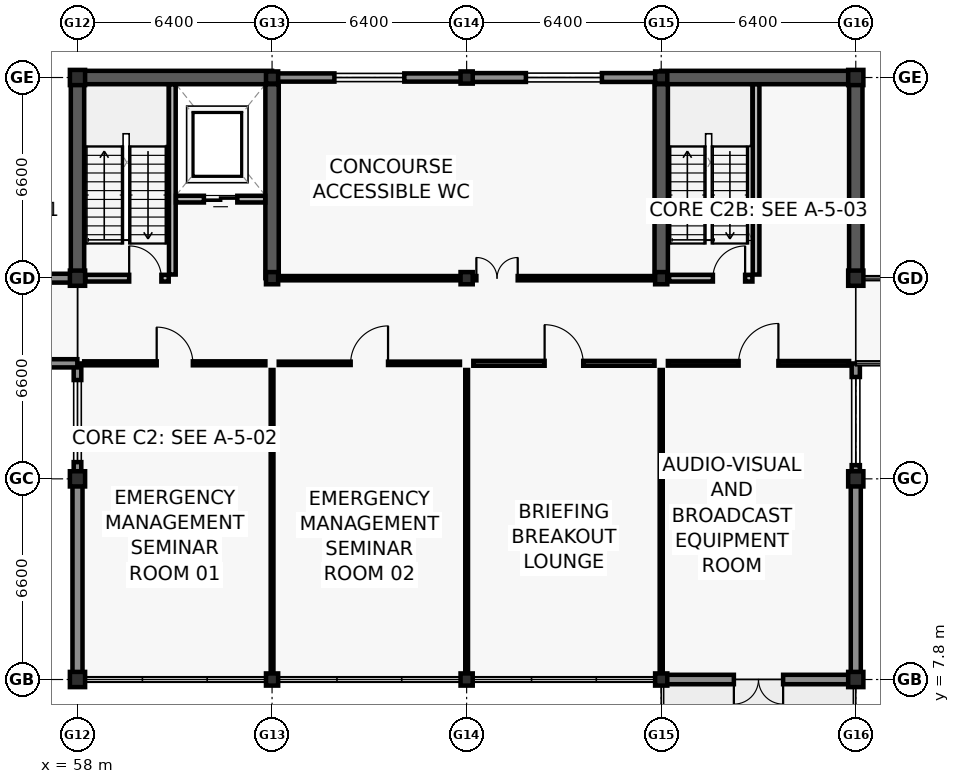
"""IFC4 building model, lengths in metres.
Left out: names, types, materials, properties, quantities, classifications, styles, units other than length and angle.
Written with IfcOpenShell. Run it as: python <this file> out.ifc"""

import sys

from ifc_helpers import new_model, si_unit, direction, frame, frame_2d, origin, origin_2d, place, context, subcontext, project, spatial, rectangle, i_section, extrude, element, fill, save


model = new_model("IFC4")
c1 = context("Model", 3, precision=1e-05, world=origin(), true_north=direction((0.0, 1.0)))
c2 = subcontext(c1, "Body", "Model", "MODEL_VIEW")
j1 = project(units=[si_unit("LENGTHUNIT", "METRE"), si_unit("PLANEANGLEUNIT", "RADIAN")], contexts=[c1])
p1 = place(None, origin())
s1 = spatial("IfcSite", under=j1, at=p1, CompositionType="ELEMENT")
p2 = place(p1, origin())
s2 = spatial("IfcBuilding", under=s1, at=p2, CompositionType="ELEMENT")
p3 = place(p2, frame((0.0, 0.0, 5.4)))
s3 = spatial("IfcBuildingStorey", under=s2, at=p3, CompositionType="ELEMENT", Elevation=5.4)
for number, where, z_axis, x_axis in (
    (1, (58.0, 7.8, 0.0), (0.0, 0.0, 1.0), (1.0, 0.0, 0.0)),
    (2, (58.0, 14.4, 0.0), (0.0, 0.0, 1.0), (1.0, 0.0, 0.0)),
    (3, (58.0, 21.0, 0.0), (0.0, 0.0, 1.0), (1.0, 0.0, 0.0)),
    (4, (58.0, 27.6, 0.0), (0.0, 0.0, 1.0), (1.0, 0.0, 0.0)),
):
    element("IfcColumn", number, at=place(p3, frame(where, z_axis=z_axis, x_axis=x_axis)), inside=s3, PredefinedType="COLUMN", context=c2, shape_type="SweptSolid", body=[
        extrude(i_section(OverallWidth=0.5, OverallDepth=0.5, WebThickness=0.02, FlangeThickness=0.036, at=origin_2d()), origin(), (0.0, 0.0, 1.0), 4.2),
    ])
for number, where, z_axis, x_axis in (
    (5, (64.4, 7.8, 0.0), (0.0, 0.0, 1.0), (1.0, 0.0, 0.0)),
    (6, (64.4, 21.0, 0.0), (0.0, 0.0, 1.0), (1.0, 0.0, 0.0)),
    (7, (64.4, 27.6, 0.0), (0.0, 0.0, 1.0), (1.0, 0.0, 0.0)),
    (8, (70.8, 7.8, 0.0), (0.0, 0.0, 1.0), (1.0, 0.0, 0.0)),
    (9, (70.8, 21.0, 0.0), (0.0, 0.0, 1.0), (1.0, 0.0, 0.0)),
    (10, (70.8, 27.6, 0.0), (0.0, 0.0, 1.0), (1.0, 0.0, 0.0)),
    (11, (77.2, 7.8, 0.0), (0.0, 0.0, 1.0), (1.0, 0.0, 0.0)),
    (12, (77.2, 21.0, 0.0), (0.0, 0.0, 1.0), (1.0, 0.0, 0.0)),
    (13, (77.2, 27.6, 0.0), (0.0, 0.0, 1.0), (1.0, 0.0, 0.0)),
):
    element("IfcColumn", number, at=place(p3, frame(where, z_axis=z_axis, x_axis=x_axis)), inside=s3, PredefinedType="COLUMN", context=c2, shape_type="SweptSolid", body=[
        extrude(i_section(OverallWidth=0.4, OverallDepth=0.4, WebThickness=0.02, FlangeThickness=0.032, at=origin_2d()), origin(), (0.0, 0.0, 1.0), 4.2),
    ])
for number, where, z_axis, x_axis in (
    (14, (83.6, 7.8, 0.0), (0.0, 0.0, 1.0), (1.0, 0.0, 0.0)),
    (15, (83.6, 14.4, 0.0), (0.0, 0.0, 1.0), (1.0, 0.0, 0.0)),
    (16, (83.6, 21.0, 0.0), (0.0, 0.0, 1.0), (1.0, 0.0, 0.0)),
    (17, (83.6, 27.6, 0.0), (0.0, 0.0, 1.0), (1.0, 0.0, 0.0)),
):
    element("IfcColumn", number, at=place(p3, frame(where, z_axis=z_axis, x_axis=x_axis)), inside=s3, PredefinedType="COLUMN", context=c2, shape_type="SweptSolid", body=[
        extrude(i_section(OverallWidth=0.5, OverallDepth=0.5, WebThickness=0.02, FlangeThickness=0.036, at=origin_2d()), origin(), (0.0, 0.0, 1.0), 4.2),
    ])
p4 = place(p3, frame((58.0, 27.6, 0.0), z_axis=(0.0, 0.0, 1.0), x_axis=(1.0, 0.0, 0.0)))
e18 = element("IfcWall", 18, at=p4, inside=s3, PredefinedType="SHEAR", context=c2, shape_type="SweptSolid", body=[
    extrude(rectangle(XDim=6.4, YDim=0.44, at=frame_2d((3.2, 0.0))), origin(), (0.0, 0.0, 1.0), 3.96),
])
for number, where, z_axis, x_axis in (
    (19, (58.0, 21.0, 0.0), (0.0, 0.0, 1.0), (0.0, 1.0, 0.0)),
    (20, (64.4, 21.0, 0.0), (0.0, 0.0, 1.0), (0.0, 1.0, 0.0)),
):
    element("IfcWall", number, at=place(p3, frame(where, z_axis=z_axis, x_axis=x_axis)), inside=s3, PredefinedType="SHEAR", context=c2, shape_type="SweptSolid", body=[
        extrude(rectangle(XDim=6.38, YDim=0.44, at=frame_2d((3.19, 0.0))), origin(), (0.0, 0.0, 1.0), 3.96),
    ])
p5 = place(p3, frame((77.2, 27.6, 0.0), z_axis=(0.0, 0.0, 1.0), x_axis=(1.0, 0.0, 0.0)))
e21 = element("IfcWall", 21, at=p5, inside=s3, PredefinedType="SHEAR", context=c2, shape_type="SweptSolid", body=[
    extrude(rectangle(XDim=6.4, YDim=0.44, at=frame_2d((3.2, 0.0))), origin(), (0.0, 0.0, 1.0), 3.96),
])
for number, where, z_axis, x_axis in (
    (22, (77.2, 21.0, 0.0), (0.0, 0.0, 1.0), (0.0, 1.0, 0.0)),
    (23, (83.6, 21.0, 0.0), (0.0, 0.0, 1.0), (0.0, 1.0, 0.0)),
):
    element("IfcWall", number, at=place(p3, frame(where, z_axis=z_axis, x_axis=x_axis)), inside=s3, PredefinedType="SHEAR", context=c2, shape_type="SweptSolid", body=[
        extrude(rectangle(XDim=6.38, YDim=0.44, at=frame_2d((3.19, 0.0))), origin(), (0.0, 0.0, 1.0), 3.96),
    ])
p6 = place(p3, frame((64.405, 27.6, 0.0), z_axis=(0.0, 0.0, 1.0), x_axis=(1.0, 0.0, 0.0)))
e24 = element("IfcWall", 24, at=p6, inside=s3, PredefinedType="SOLIDWALL", context=c2, shape_type="SweptSolid", body=[
    extrude(rectangle(XDim=6.39, YDim=0.27, at=frame_2d((3.195, 0.0))), origin(), (0.0, 0.0, 1.0), 3.32),
])
p7 = place(p6, frame((2.045, 0.0, 0.72)))
e25 = element("IfcOpeningElement", 25, at=p7, cuts=e24, PredefinedType="OPENING", context=c2, shape_type="SweptSolid", body=[
    extrude(rectangle(XDim=2.3, YDim=1.15, at=frame_2d((1.15, 0.575))), frame((0.0, 0.145, 0.0), z_axis=(0.0, -1.0, 0.0), x_axis=(1.0, 0.0, 0.0)), (0.0, 0.0, 1.0), 0.29),
])
p8 = place(p3, frame((70.805, 27.6, 0.0), z_axis=(0.0, 0.0, 1.0), x_axis=(1.0, 0.0, 0.0)))
e26 = element("IfcWall", 26, at=p8, inside=s3, PredefinedType="SOLIDWALL", context=c2, shape_type="SweptSolid", body=[
    extrude(rectangle(XDim=6.39, YDim=0.29, at=frame_2d((3.195, 0.0))), origin(), (0.0, 0.0, 1.0), 3.32),
])
p9 = place(p8, frame((1.945, 0.0, 0.72)))
e27 = element("IfcOpeningElement", 27, at=p9, cuts=e26, PredefinedType="OPENING", context=c2, shape_type="SweptSolid", body=[
    extrude(rectangle(XDim=2.5, YDim=1.15, at=frame_2d((1.25, 0.575))), frame((0.0, 0.155, 0.0), z_axis=(0.0, -1.0, 0.0), x_axis=(1.0, 0.0, 0.0)), (0.0, 0.0, 1.0), 0.31),
])
p10 = place(p3, frame((83.595, 7.8, 0.0), z_axis=(0.0, 0.0, 1.0), x_axis=(-1.0, 0.0, 0.0)))
e28 = element("IfcWall", 28, at=p10, inside=s3, PredefinedType="SOLIDWALL", context=c2, shape_type="SweptSolid", body=[
    extrude(rectangle(XDim=6.39, YDim=0.31, at=frame_2d((3.195, 0.0))), origin(), (0.0, 0.0, 1.0), 3.32),
])
p11 = place(p10, frame((2.385, 0.0, 0.0)))
e29 = element("IfcOpeningElement", 29, at=p11, cuts=e28, PredefinedType="OPENING", context=c2, shape_type="SweptSolid", body=[
    extrude(rectangle(XDim=1.62, YDim=2.18, at=frame_2d((0.81, 1.09))), frame((0.0, 0.165, 0.0), z_axis=(0.0, -1.0, 0.0), x_axis=(1.0, 0.0, 0.0)), (0.0, 0.0, 1.0), 0.33),
])
for number, where, z_axis, x_axis in (
    (30, (58.0, 7.805, 0.0), (0.0, 0.0, 1.0), (0.0, 1.0, 0.0)),
    (31, (83.6, 14.395, 0.0), (0.0, 0.0, 1.0), (0.0, -1.0, 0.0)),
):
    element("IfcWall", number, at=place(p3, frame(where, z_axis=z_axis, x_axis=x_axis)), inside=s3, PredefinedType="SOLIDWALL", context=c2, shape_type="SweptSolid", body=[
        extrude(rectangle(XDim=6.59, YDim=0.33, at=frame_2d((3.295, 0.0))), origin(), (0.0, 0.0, 1.0), 3.32),
    ])
p12 = place(p3, frame((58.0, 14.405, 0.0), z_axis=(0.0, 0.0, 1.0), x_axis=(0.0, 1.0, 0.0)))
e32 = element("IfcWall", 32, at=p12, inside=s3, PredefinedType="SOLIDWALL", context=c2, shape_type="SweptSolid", body=[
    extrude(rectangle(XDim=3.79, YDim=0.25, at=frame_2d((1.895, 0.0))), origin(), (0.0, 0.0, 1.0), 3.32),
])
p13 = place(p12, frame((0.545, 0.0, 0.72)))
e33 = element("IfcOpeningElement", 33, at=p13, cuts=e32, PredefinedType="OPENING", context=c2, shape_type="SweptSolid", body=[
    extrude(rectangle(XDim=2.7, YDim=1.15, at=frame_2d((1.35, 0.575))), frame((0.0, 0.135, 0.0), z_axis=(0.0, -1.0, 0.0), x_axis=(1.0, 0.0, 0.0)), (0.0, 0.0, 1.0), 0.27),
])
p14 = place(p3, frame((83.6, 18.195, 0.0), z_axis=(0.0, 0.0, 1.0), x_axis=(0.0, -1.0, 0.0)))
e34 = element("IfcWall", 34, at=p14, inside=s3, PredefinedType="SOLIDWALL", context=c2, shape_type="SweptSolid", body=[
    extrude(rectangle(XDim=3.79, YDim=0.27, at=frame_2d((1.895, 0.0))), origin(), (0.0, 0.0, 1.0), 3.32),
])
p15 = place(p14, frame((0.445, 0.0, 0.72)))
e35 = element("IfcOpeningElement", 35, at=p15, cuts=e34, PredefinedType="OPENING", context=c2, shape_type="SweptSolid", body=[
    extrude(rectangle(XDim=2.9, YDim=1.15, at=frame_2d((1.45, 0.575))), frame((0.0, 0.145, 0.0), z_axis=(0.0, -1.0, 0.0), x_axis=(1.0, 0.0, 0.0)), (0.0, 0.0, 1.0), 0.29),
])
p16 = place(p3, frame((57.995, 18.2, 0.0), z_axis=(0.0, 0.0, 1.0), x_axis=(-1.0, 0.0, 0.0)))
e36 = element("IfcWall", 36, at=p16, inside=s3, PredefinedType="SOLIDWALL", context=c2, shape_type="SweptSolid", body=[
    extrude(rectangle(XDim=1.19, YDim=0.27, at=frame_2d((0.595, 0.0))), origin(), (0.0, 0.0, 1.0), 3.32),
])
p17 = place(p3, frame((56.805, 21.0, 0.0), z_axis=(0.0, 0.0, 1.0), x_axis=(1.0, 0.0, 0.0)))
e37 = element("IfcWall", 37, at=p17, inside=s3, PredefinedType="SOLIDWALL", context=c2, shape_type="SweptSolid", body=[
    extrude(rectangle(XDim=1.19, YDim=0.29, at=frame_2d((0.595, 0.0))), origin(), (0.0, 0.0, 1.0), 3.32),
])
p18 = place(p3, frame((61.12, 21.12, 0.0), z_axis=(0.0, 0.0, 1.0), x_axis=(0.0, 1.0, 0.0)))
e38 = element("IfcWall", 38, at=p18, inside=s3, PredefinedType="SOLIDWALL", context=c2, shape_type="SweptSolid", body=[
    extrude(rectangle(XDim=6.255, YDim=0.22, at=frame_2d((3.127, 0.0))), origin(), (0.0, 0.0, 1.0), 3.96),
])
p19 = place(p3, frame((58.26, 21.0, 0.0), z_axis=(0.0, 0.0, 1.0), x_axis=(1.0, 0.0, 0.0)))
e39 = element("IfcWall", 39, at=p19, inside=s3, PredefinedType="SOLIDWALL", context=c2, shape_type="SweptSolid", body=[
    extrude(rectangle(XDim=2.74, YDim=0.22, at=frame_2d((1.37, 0.0))), origin(), (0.0, 0.0, 1.0), 3.32),
])
p20 = place(p19, frame((1.44, 0.0, 0.0)))
e40 = element("IfcOpeningElement", 40, at=p20, cuts=e39, PredefinedType="OPENING", context=c2, shape_type="SweptSolid", body=[
    extrude(rectangle(XDim=1.06, YDim=2.1, at=frame_2d((0.53, 1.05))), frame((0.0, 0.12, 0.0), z_axis=(0.0, -1.0, 0.0), x_axis=(1.0, 0.0, 0.0)), (0.0, 0.0, 1.0), 0.24),
])
p21 = place(p3, frame((61.24, 23.6, 0.0), z_axis=(0.0, 0.0, 1.0), x_axis=(1.0, 0.0, 0.0)))
e41 = element("IfcWall", 41, at=p21, inside=s3, PredefinedType="SOLIDWALL", context=c2, shape_type="SweptSolid", body=[
    extrude(rectangle(XDim=2.935, YDim=0.22, at=frame_2d((1.468, 0.0))), origin(), (0.0, 0.0, 1.0), 3.96),
])
p22 = place(p21, frame((0.917, 0.0, 0.0)))
e42 = element("IfcOpeningElement", 42, at=p22, cuts=e41, PredefinedType="OPENING", context=c2, shape_type="SweptSolid", body=[
    extrude(rectangle(XDim=1.1, YDim=2.1, at=frame_2d((0.55, 1.05))), frame((0.0, 0.12, 0.0), z_axis=(0.0, -1.0, 0.0), x_axis=(1.0, 0.0, 0.0)), (0.0, 0.0, 1.0), 0.24),
])
p23 = place(p3, frame((80.32, 21.12, 0.0), z_axis=(0.0, 0.0, 1.0), x_axis=(0.0, 1.0, 0.0)))
e43 = element("IfcWall", 43, at=p23, inside=s3, PredefinedType="SOLIDWALL", context=c2, shape_type="SweptSolid", body=[
    extrude(rectangle(XDim=6.255, YDim=0.22, at=frame_2d((3.127, 0.0))), origin(), (0.0, 0.0, 1.0), 3.96),
])
p24 = place(p3, frame((77.46, 21.0, 0.0), z_axis=(0.0, 0.0, 1.0), x_axis=(1.0, 0.0, 0.0)))
e44 = element("IfcWall", 44, at=p24, inside=s3, PredefinedType="SOLIDWALL", context=c2, shape_type="SweptSolid", body=[
    extrude(rectangle(XDim=2.74, YDim=0.22, at=frame_2d((1.37, 0.0))), origin(), (0.0, 0.0, 1.0), 3.32),
])
p25 = place(p24, frame((1.44, 0.0, 0.0)))
e45 = element("IfcOpeningElement", 45, at=p25, cuts=e44, PredefinedType="OPENING", context=c2, shape_type="SweptSolid", body=[
    extrude(rectangle(XDim=1.06, YDim=2.1, at=frame_2d((0.53, 1.05))), frame((0.0, 0.12, 0.0), z_axis=(0.0, -1.0, 0.0), x_axis=(1.0, 0.0, 0.0)), (0.0, 0.0, 1.0), 0.24),
])
p26 = place(p3, frame((64.4, 8.02, 0.0), z_axis=(0.0, 0.0, 1.0), x_axis=(0.0, 1.0, 0.0)))
e46 = element("IfcWall", 46, at=p26, inside=s3, PredefinedType="MOVABLE", context=c2, shape_type="SweptSolid", body=[
    extrude(rectangle(XDim=9.96, YDim=0.09, at=frame_2d((4.98, 0.0))), origin(), (0.0, 0.0, 1.0), 3.3),
])
p27 = place(p3, frame((58.22, 18.2, 0.0), z_axis=(0.0, 0.0, 1.0), x_axis=(1.0, 0.0, 0.0)))
e47 = element("IfcWall", 47, at=p27, inside=s3, PredefinedType="PARTITIONING", context=c2, shape_type="SweptSolid", body=[
    extrude(rectangle(XDim=5.96, YDim=0.13, at=frame_2d((2.98, 0.0))), origin(), (0.0, 0.0, 1.0), 3.3),
])
p28 = place(p27, frame((2.385, 0.0, 0.0)))
e48 = element("IfcOpeningElement", 48, at=p28, cuts=e47, PredefinedType="OPENING", context=c2, shape_type="SweptSolid", body=[
    extrude(rectangle(XDim=1.19, YDim=2.14, at=frame_2d((0.595, 1.07))), frame((0.0, 0.075, 0.0), z_axis=(0.0, -1.0, 0.0), x_axis=(1.0, 0.0, 0.0)), (0.0, 0.0, 1.0), 0.15),
])
p29 = place(p3, frame((70.8, 8.02, 0.0), z_axis=(0.0, 0.0, 1.0), x_axis=(0.0, 1.0, 0.0)))
e49 = element("IfcWall", 49, at=p29, inside=s3, PredefinedType="MOVABLE", context=c2, shape_type="SweptSolid", body=[
    extrude(rectangle(XDim=9.96, YDim=0.09, at=frame_2d((4.98, 0.0))), origin(), (0.0, 0.0, 1.0), 3.3),
])
p30 = place(p3, frame((64.62, 18.2, 0.0), z_axis=(0.0, 0.0, 1.0), x_axis=(1.0, 0.0, 0.0)))
e50 = element("IfcWall", 50, at=p30, inside=s3, PredefinedType="PARTITIONING", context=c2, shape_type="SweptSolid", body=[
    extrude(rectangle(XDim=5.96, YDim=0.11, at=frame_2d((2.98, 0.0))), origin(), (0.0, 0.0, 1.0), 3.3),
])
p31 = place(p30, frame((2.365, 0.0, 0.0)))
e51 = element("IfcOpeningElement", 51, at=p31, cuts=e50, PredefinedType="OPENING", context=c2, shape_type="SweptSolid", body=[
    extrude(rectangle(XDim=1.23, YDim=2.08, at=frame_2d((0.615, 1.04))), frame((0.0, 0.065, 0.0), z_axis=(0.0, -1.0, 0.0), x_axis=(1.0, 0.0, 0.0)), (0.0, 0.0, 1.0), 0.13),
])
p32 = place(p3, frame((77.2, 8.02, 0.0), z_axis=(0.0, 0.0, 1.0), x_axis=(0.0, 1.0, 0.0)))
e52 = element("IfcWall", 52, at=p32, inside=s3, PredefinedType="PARTITIONING", context=c2, shape_type="SweptSolid", body=[
    extrude(rectangle(XDim=9.96, YDim=0.1, at=frame_2d((4.98, 0.0))), origin(), (0.0, 0.0, 1.0), 3.3),
])
p33 = place(p3, frame((71.02, 18.2, 0.0), z_axis=(0.0, 0.0, 1.0), x_axis=(1.0, 0.0, 0.0)))
e53 = element("IfcWall", 53, at=p33, inside=s3, PredefinedType="PARTITIONING", context=c2, shape_type="SweptSolid", body=[
    extrude(rectangle(XDim=5.96, YDim=0.16, at=frame_2d((2.98, 0.0))), origin(), (0.0, 0.0, 1.0), 3.3),
])
p34 = place(p33, frame((2.345, 0.0, 0.0)))
e54 = element("IfcOpeningElement", 54, at=p34, cuts=e53, PredefinedType="OPENING", context=c2, shape_type="SweptSolid", body=[
    extrude(rectangle(XDim=1.27, YDim=2.1, at=frame_2d((0.635, 1.05))), frame((0.0, 0.09, 0.0), z_axis=(0.0, -1.0, 0.0), x_axis=(1.0, 0.0, 0.0)), (0.0, 0.0, 1.0), 0.18),
])
p35 = place(p3, frame((77.42, 18.2, 0.0), z_axis=(0.0, 0.0, 1.0), x_axis=(1.0, 0.0, 0.0)))
e55 = element("IfcWall", 55, at=p35, inside=s3, PredefinedType="PARTITIONING", context=c2, shape_type="SweptSolid", body=[
    extrude(rectangle(XDim=5.96, YDim=0.15, at=frame_2d((2.98, 0.0))), origin(), (0.0, 0.0, 1.0), 3.3),
])
p36 = place(p35, frame((2.325, 0.0, 0.0)))
e56 = element("IfcOpeningElement", 56, at=p36, cuts=e55, PredefinedType="OPENING", context=c2, shape_type="SweptSolid", body=[
    extrude(rectangle(XDim=1.31, YDim=2.14, at=frame_2d((0.655, 1.07))), frame((0.0, 0.085, 0.0), z_axis=(0.0, -1.0, 0.0), x_axis=(1.0, 0.0, 0.0)), (0.0, 0.0, 1.0), 0.17),
])
p37 = place(p3, frame((64.62, 21.0, 0.0), z_axis=(0.0, 0.0, 1.0), x_axis=(1.0, 0.0, 0.0)))
e57 = element("IfcWall", 57, at=p37, inside=s3, PredefinedType="PARTITIONING", context=c2, shape_type="SweptSolid", body=[
    extrude(rectangle(XDim=12.36, YDim=0.14, at=frame_2d((6.18, 0.0))), origin(), (0.0, 0.0, 1.0), 3.3),
])
p38 = place(p37, frame((6.5, 0.0, 0.0)))
e58 = element("IfcOpeningElement", 58, at=p38, cuts=e57, PredefinedType="OPENING", context=c2, shape_type="SweptSolid", body=[
    extrude(rectangle(XDim=1.36, YDim=2.15, at=frame_2d((0.68, 1.075))), frame((0.0, 0.08, 0.0), z_axis=(0.0, -1.0, 0.0), x_axis=(1.0, 0.0, 0.0)), (0.0, 0.0, 1.0), 0.16),
])
p39 = place(p7, origin())
e59 = element("IfcWindow", 59, at=p39, inside=s3, PartitioningType="DOUBLE_PANEL_VERTICAL", PredefinedType="WINDOW", context=c2, shape_type="SweptSolid", body=[
    extrude(rectangle(XDim=2.3, YDim=1.15, at=frame_2d((1.15, 0.575))), frame((0.0, 0.03, 0.0), z_axis=(0.0, -1.0, 0.0), x_axis=(1.0, 0.0, 0.0)), (0.0, 0.0, 1.0), 0.06),
])
fill(e25, e59)
p40 = place(p9, origin())
e60 = element("IfcWindow", 60, at=p40, inside=s3, PartitioningType="TRIPLE_PANEL_VERTICAL", PredefinedType="WINDOW", context=c2, shape_type="SweptSolid", body=[
    extrude(rectangle(XDim=2.5, YDim=1.15, at=frame_2d((1.25, 0.575))), frame((0.0, 0.03, 0.0), z_axis=(0.0, -1.0, 0.0), x_axis=(1.0, 0.0, 0.0)), (0.0, 0.0, 1.0), 0.06),
])
fill(e27, e60)
p41 = place(p11, origin())
e61 = element("IfcDoor", 61, at=p41, inside=s3, OperationType="DOUBLE_DOOR_SINGLE_SWING", PredefinedType="DOOR", context=c2, shape_type="SweptSolid", body=[
    extrude(rectangle(XDim=1.62, YDim=2.18, at=frame_2d((0.81, 1.09))), frame((0.0, 0.025, 0.0), z_axis=(0.0, -1.0, 0.0), x_axis=(1.0, 0.0, 0.0)), (0.0, 0.0, 1.0), 0.05),
])
fill(e29, e61)
p42 = place(p13, origin())
e62 = element("IfcWindow", 62, at=p42, inside=s3, PartitioningType="TRIPLE_PANEL_VERTICAL", PredefinedType="WINDOW", context=c2, shape_type="SweptSolid", body=[
    extrude(rectangle(XDim=2.7, YDim=1.15, at=frame_2d((1.35, 0.575))), frame((0.0, 0.03, 0.0), z_axis=(0.0, -1.0, 0.0), x_axis=(1.0, 0.0, 0.0)), (0.0, 0.0, 1.0), 0.06),
])
fill(e33, e62)
p43 = place(p15, origin())
e63 = element("IfcWindow", 63, at=p43, inside=s3, PartitioningType="TRIPLE_PANEL_VERTICAL", PredefinedType="WINDOW", context=c2, shape_type="SweptSolid", body=[
    extrude(rectangle(XDim=2.9, YDim=1.15, at=frame_2d((1.45, 0.575))), frame((0.0, 0.03, 0.0), z_axis=(0.0, -1.0, 0.0), x_axis=(1.0, 0.0, 0.0)), (0.0, 0.0, 1.0), 0.06),
])
fill(e35, e63)
p44 = place(p20, origin())
e64 = element("IfcDoor", 64, at=p44, inside=s3, OperationType="SINGLE_SWING_LEFT", PredefinedType="DOOR", context=c2, shape_type="SweptSolid", body=[
    extrude(rectangle(XDim=1.06, YDim=2.1, at=frame_2d((0.53, 1.05))), frame((0.0, 0.025, 0.0), z_axis=(0.0, -1.0, 0.0), x_axis=(1.0, 0.0, 0.0)), (0.0, 0.0, 1.0), 0.05),
])
fill(e40, e64)
p45 = place(p22, origin())
e65 = element("IfcDoor", 65, at=p45, inside=s3, OperationType="DOUBLE_DOOR_SLIDING", PredefinedType="DOOR", context=c2, shape_type="SweptSolid", body=[
    extrude(rectangle(XDim=1.1, YDim=2.1, at=frame_2d((0.55, 1.05))), frame((0.0, 0.025, 0.0), z_axis=(0.0, -1.0, 0.0), x_axis=(1.0, 0.0, 0.0)), (0.0, 0.0, 1.0), 0.05),
])
fill(e42, e65)
p46 = place(p25, origin())
e66 = element("IfcDoor", 66, at=p46, inside=s3, OperationType="SINGLE_SWING_RIGHT", PredefinedType="DOOR", context=c2, shape_type="SweptSolid", body=[
    extrude(rectangle(XDim=1.06, YDim=2.1, at=frame_2d((0.53, 1.05))), frame((0.0, 0.025, 0.0), z_axis=(0.0, -1.0, 0.0), x_axis=(1.0, 0.0, 0.0)), (0.0, 0.0, 1.0), 0.05),
])
fill(e45, e66)
p47 = place(p28, origin())
e67 = element("IfcDoor", 67, at=p47, inside=s3, OperationType="SINGLE_SWING_LEFT", PredefinedType="DOOR", context=c2, shape_type="SweptSolid", body=[
    extrude(rectangle(XDim=1.19, YDim=2.14, at=frame_2d((0.595, 1.07))), frame((0.0, 0.025, 0.0), z_axis=(0.0, -1.0, 0.0), x_axis=(1.0, 0.0, 0.0)), (0.0, 0.0, 1.0), 0.05),
])
fill(e48, e67)
p48 = place(p31, origin())
e68 = element("IfcDoor", 68, at=p48, inside=s3, OperationType="SINGLE_SWING_RIGHT", PredefinedType="DOOR", context=c2, shape_type="SweptSolid", body=[
    extrude(rectangle(XDim=1.23, YDim=2.08, at=frame_2d((0.615, 1.04))), frame((0.0, 0.025, 0.0), z_axis=(0.0, -1.0, 0.0), x_axis=(1.0, 0.0, 0.0)), (0.0, 0.0, 1.0), 0.05),
])
fill(e51, e68)
p49 = place(p34, origin())
e69 = element("IfcDoor", 69, at=p49, inside=s3, OperationType="SINGLE_SWING_LEFT", PredefinedType="DOOR", context=c2, shape_type="SweptSolid", body=[
    extrude(rectangle(XDim=1.27, YDim=2.1, at=frame_2d((0.635, 1.05))), frame((0.0, 0.025, 0.0), z_axis=(0.0, -1.0, 0.0), x_axis=(1.0, 0.0, 0.0)), (0.0, 0.0, 1.0), 0.05),
])
fill(e54, e69)
p50 = place(p36, origin())
e70 = element("IfcDoor", 70, at=p50, inside=s3, OperationType="SINGLE_SWING_RIGHT", PredefinedType="DOOR", context=c2, shape_type="SweptSolid", body=[
    extrude(rectangle(XDim=1.31, YDim=2.14, at=frame_2d((0.655, 1.07))), frame((0.0, 0.025, 0.0), z_axis=(0.0, -1.0, 0.0), x_axis=(1.0, 0.0, 0.0)), (0.0, 0.0, 1.0), 0.05),
])
fill(e56, e70)
p51 = place(p38, origin())
e71 = element("IfcDoor", 71, at=p51, inside=s3, OperationType="DOUBLE_DOOR_SINGLE_SWING", PredefinedType="DOOR", context=c2, shape_type="SweptSolid", body=[
    extrude(rectangle(XDim=1.36, YDim=2.15, at=frame_2d((0.68, 1.075))), frame((0.0, 0.025, 0.0), z_axis=(0.0, -1.0, 0.0), x_axis=(1.0, 0.0, 0.0)), (0.0, 0.0, 1.0), 0.05),
])
fill(e58, e71)
save(model, sys.argv[1])
